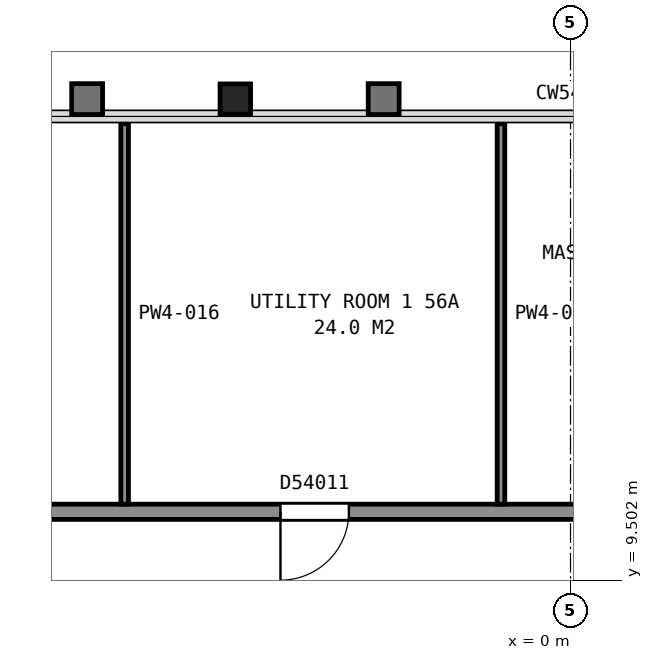
"""IFC4 building model, lengths in metres.
Left out: names, types, materials, properties, quantities, classifications, styles, units other than length and angle.
Written with IfcOpenShell. Run it as: python <this file> out.ifc"""

import sys

from ifc_helpers import new_model, si_unit, direction, frame, frame_2d, origin, origin_2d, place, context, subcontext, project, spatial, rectangle, i_section, extrude, element, fill, save


model = new_model("IFC4")
c1 = context("Model", 3, precision=1e-05, world=origin(), true_north=direction((0.0, 1.0)))
c2 = subcontext(c1, "Body", "Model", "MODEL_VIEW")
j1 = project(units=[si_unit("LENGTHUNIT", "METRE"), si_unit("PLANEANGLEUNIT", "RADIAN")], contexts=[c1])
p1 = place(None, origin())
s1 = spatial("IfcSite", under=j1, at=p1, CompositionType="ELEMENT")
p2 = place(p1, origin())
s2 = spatial("IfcBuilding", under=s1, at=p2, CompositionType="ELEMENT")
p3 = place(p2, frame((0.0, 0.0, 224.9)))
s3 = spatial("IfcBuildingStorey", under=s2, at=p3, CompositionType="ELEMENT", Elevation=224.9)
p4 = place(p3, frame((-4.41, 15.83, 0.0), z_axis=(0.0, 0.0, 1.0), x_axis=(1.0, 0.0, 0.0)))
e1 = element("IfcColumn", 1, at=p4, inside=s3, PredefinedType="COLUMN", context=c2, shape_type="SweptSolid", body=[
    extrude(i_section(OverallWidth=0.401, OverallDepth=0.399, WebThickness=0.025, FlangeThickness=0.04, FilletRadius=0.015, at=origin_2d()), origin(), (0.0, 0.0, 1.0), 3.7),
])
p5 = place(p3, frame((-6.178, 5.299, 0.0), z_axis=(0.0, 0.0, 1.0), x_axis=(-0.866019993635, 0.500009370536, 0.0)))
e2 = element("IfcWall", 2, at=p5, inside=s3, PredefinedType="PARTITIONING", context=c2, shape_type="SweptSolid", body=[
    extrude(rectangle(XDim=9.6, YDim=0.2, at=frame_2d((4.8, 0.0))), origin(), (0.0, 0.0, 1.0), 3.45),
])
p6 = place(p3, frame((-8.667, 10.4, 0.0), z_axis=(0.0, 0.0, 1.0), x_axis=(1.0, 0.0, 0.0)))
e3 = element("IfcWall", 3, at=p6, inside=s3, PredefinedType="PARTITIONING", context=c2, shape_type="SweptSolid", body=[
    extrude(rectangle(XDim=17.334, YDim=0.2, at=frame_2d((8.667, 0.0))), origin(), (0.0, 0.0, 1.0), 2.713),
])
p7 = place(p6, frame((9.252, 0.0, 0.0)))
e4 = element("IfcOpeningElement", 4, at=p7, cuts=e3, PredefinedType="OPENING", context=c2, shape_type="SweptSolid", body=[
    extrude(rectangle(XDim=0.9, YDim=2.1, at=frame_2d((0.45, 1.05))), frame((0.0, 0.11, 0.0), z_axis=(0.0, -1.0, 0.0), x_axis=(1.0, 0.0, 0.0)), (0.0, 0.0, 1.0), 0.22),
])
p8 = place(p6, frame((4.851, 0.0, 0.0)))
e5 = element("IfcOpeningElement", 5, at=p8, cuts=e3, PredefinedType="OPENING", context=c2, shape_type="SweptSolid", body=[
    extrude(rectangle(XDim=0.9, YDim=2.1, at=frame_2d((0.45, 1.05))), frame((0.0, 0.11, 0.0), z_axis=(0.0, -1.0, 0.0), x_axis=(1.0, 0.0, 0.0)), (0.0, 0.0, 1.0), 0.22),
])
for number, where, z_axis, x_axis in (
    (6, (-5.866, 10.5, 0.0), (0.0, 0.0, 1.0), (0.0, 1.0, 0.0)),
    (7, (-0.915, 10.5, 0.0), (0.0, 0.0, 1.0), (0.0, 1.0, 0.0)),
):
    element("IfcWall", number, at=place(p3, frame(where, z_axis=z_axis, x_axis=x_axis)), inside=s3, PredefinedType="PARTITIONING", context=c2, shape_type="SweptSolid", body=[
        extrude(rectangle(XDim=5.006, YDim=0.1, at=frame_2d((2.503, 0.0))), origin(), (0.0, 0.0, 1.0), 2.713),
    ])
p9 = place(p8, origin())
e8 = element("IfcDoor", 8, at=p9, inside=s3, OperationType="SINGLE_SWING_LEFT", PredefinedType="DOOR", context=c2, shape_type="SweptSolid", body=[
    extrude(rectangle(XDim=0.9, YDim=2.1, at=frame_2d((0.45, 1.05))), frame((0.0, 0.025, 0.0), z_axis=(0.0, -1.0, 0.0), x_axis=(1.0, 0.0, 0.0)), (0.0, 0.0, 1.0), 0.05),
])
fill(e5, e8)
save(model, sys.argv[1])
